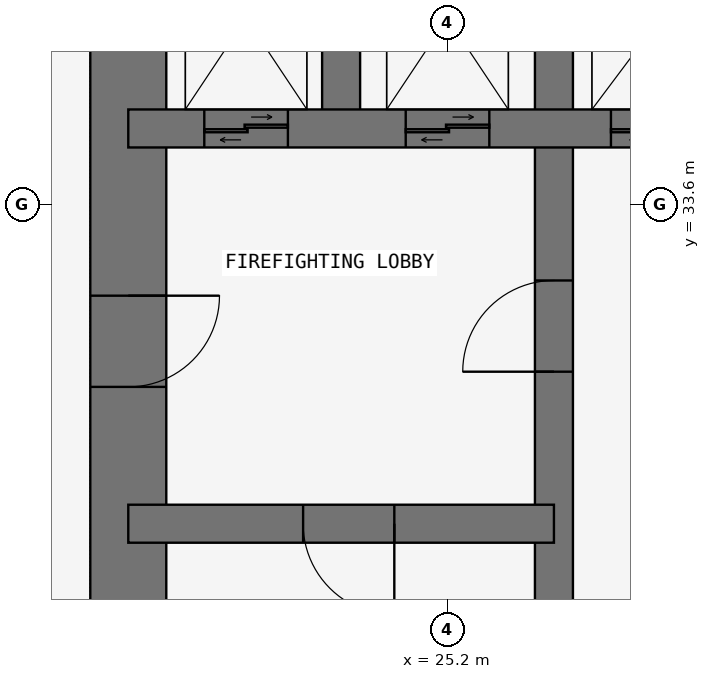
"""IFC4 building model, lengths in metres.
Left out: names, types, materials, properties, quantities, classifications, styles, units other than length and angle.
Written with IfcOpenShell. Run it as: python <this file> out.ifc"""

import sys

from ifc_helpers import new_model, si_unit, direction, frame, frame_2d, origin, place, context, subcontext, project, spatial, rectangle, extrude, element, fill, save


model = new_model("IFC4")
c1 = context("Model", 3, precision=1e-05, world=origin(), true_north=direction((0.0, 1.0)))
c2 = subcontext(c1, "Body", "Model", "MODEL_VIEW")
j1 = project(units=[si_unit("LENGTHUNIT", "METRE"), si_unit("PLANEANGLEUNIT", "RADIAN")], contexts=[c1])
p1 = place(None, origin())
s1 = spatial("IfcSite", under=j1, at=p1, CompositionType="ELEMENT")
p2 = place(p1, origin())
s2 = spatial("IfcBuilding", under=s1, at=p2, CompositionType="ELEMENT")
p3 = place(p2, frame((0.0, 0.0, 19.5)))
s3 = spatial("IfcBuildingStorey", under=s2, at=p3, CompositionType="ELEMENT", Elevation=19.5)
p4 = place(p3, frame((21.0, 37.8, 0.0), z_axis=(0.0, 0.0, 1.0), x_axis=(0.0, -1.0, 0.0)))
e1 = element("IfcWall", 1, at=p4, inside=s3, PredefinedType="SHEAR", context=c2, shape_type="SweptSolid", body=[
    extrude(rectangle(XDim=17.3, YDim=1.0, at=frame_2d((8.65, 0.0))), origin(), (0.0, 0.0, 1.0), 4.5),
])
p5 = place(p4, frame((5.4, 0.0, 0.0)))
e2 = element("IfcOpeningElement", 2, at=p5, cuts=e1, PredefinedType="OPENING", context=c2, shape_type="SweptSolid", body=[
    extrude(rectangle(XDim=1.2, YDim=2.1, at=frame_2d((0.6, 1.05))), frame((0.0, 0.51, 0.0), z_axis=(0.0, -1.0, 0.0), x_axis=(1.0, 0.0, 0.0)), (0.0, 0.0, 1.0), 1.02),
])
p6 = place(p3, frame((26.6, 21.0, 0.0), z_axis=(0.0, 0.0, 1.0), x_axis=(0.0, 1.0, 0.0)))
e3 = element("IfcWall", 3, at=p6, inside=s3, PredefinedType="SHEAR", context=c2, shape_type="SweptSolid", body=[
    extrude(rectangle(XDim=16.8, YDim=0.5, at=frame_2d((8.4, 0.0))), origin(), (0.0, 0.0, 1.0), 4.5),
])
p7 = place(p6, frame((10.4, 0.0, 0.0)))
e4 = element("IfcOpeningElement", 4, at=p7, cuts=e3, PredefinedType="OPENING", context=c2, shape_type="SweptSolid", body=[
    extrude(rectangle(XDim=1.2, YDim=2.1, at=frame_2d((0.6, 1.05))), frame((0.0, 0.26, 0.0), z_axis=(0.0, -1.0, 0.0), x_axis=(1.0, 0.0, 0.0)), (0.0, 0.0, 1.0), 0.52),
])
p8 = place(p3, frame((21.0, 29.4, 0.0), z_axis=(0.0, 0.0, 1.0), x_axis=(1.0, 0.0, 0.0)))
e5 = element("IfcWall", 5, at=p8, inside=s3, PredefinedType="SHEAR", context=c2, shape_type="SweptSolid", body=[
    extrude(rectangle(XDim=5.6, YDim=0.5, at=frame_2d((2.8, 0.0))), origin(), (0.0, 0.0, 1.0), 4.5),
])
p9 = place(p8, frame((2.3, 0.0, 0.0)))
e6 = element("IfcOpeningElement", 6, at=p9, cuts=e5, PredefinedType="OPENING", context=c2, shape_type="SweptSolid", body=[
    extrude(rectangle(XDim=1.2, YDim=2.1, at=frame_2d((0.6, 1.05))), frame((0.0, 0.26, 0.0), z_axis=(0.0, -1.0, 0.0), x_axis=(1.0, 0.0, 0.0)), (0.0, 0.0, 1.0), 0.52),
])
p10 = place(p3, frame((21.0, 34.6, 0.0), z_axis=(0.0, 0.0, 1.0), x_axis=(1.0, 0.0, 0.0)))
e7 = element("IfcWall", 7, at=p10, inside=s3, PredefinedType="SHEAR", context=c2, shape_type="SweptSolid", body=[
    extrude(rectangle(XDim=11.2, YDim=0.5, at=frame_2d((5.6, 0.0))), origin(), (0.0, 0.0, 1.0), 4.5),
])
p11 = place(p10, frame((9.35, 0.0, 0.0)))
e8 = element("IfcOpeningElement", 8, at=p11, cuts=e7, PredefinedType="OPENING", context=c2, shape_type="SweptSolid", body=[
    extrude(rectangle(XDim=0.9, YDim=2.1, at=frame_2d((0.45, 1.05))), frame((0.0, 0.26, 0.0), z_axis=(0.0, -1.0, 0.0), x_axis=(1.0, 0.0, 0.0)), (0.0, 0.0, 1.0), 0.52),
])
p12 = place(p10, frame((1.0, 0.0, 0.0)))
e9 = element("IfcOpeningElement", 9, at=p12, cuts=e7, PredefinedType="OPENING", context=c2, shape_type="SweptSolid", body=[
    extrude(rectangle(XDim=1.1, YDim=2.1, at=frame_2d((0.55, 1.05))), frame((0.0, 0.26, 0.0), z_axis=(0.0, -1.0, 0.0), x_axis=(1.0, 0.0, 0.0)), (0.0, 0.0, 1.0), 0.52),
])
p13 = place(p10, frame((3.65, 0.0, 0.0)))
e10 = element("IfcOpeningElement", 10, at=p13, cuts=e7, PredefinedType="OPENING", context=c2, shape_type="SweptSolid", body=[
    extrude(rectangle(XDim=1.1, YDim=2.1, at=frame_2d((0.55, 1.05))), frame((0.0, 0.26, 0.0), z_axis=(0.0, -1.0, 0.0), x_axis=(1.0, 0.0, 0.0)), (0.0, 0.0, 1.0), 0.52),
])
p14 = place(p10, frame((6.35, 0.0, 0.0)))
e11 = element("IfcOpeningElement", 11, at=p14, cuts=e7, PredefinedType="OPENING", context=c2, shape_type="SweptSolid", body=[
    extrude(rectangle(XDim=1.3, YDim=2.1, at=frame_2d((0.65, 1.05))), frame((0.0, 0.26, 0.0), z_axis=(0.0, -1.0, 0.0), x_axis=(1.0, 0.0, 0.0)), (0.0, 0.0, 1.0), 0.52),
])
p15 = place(p3, frame((23.8, 34.6, 0.0), z_axis=(0.0, 0.0, 1.0), x_axis=(0.0, 1.0, 0.0)))
e12 = element("IfcWall", 12, at=p15, inside=s3, PredefinedType="SHEAR", context=c2, shape_type="SweptSolid", body=[
    extrude(rectangle(XDim=3.2, YDim=0.5, at=frame_2d((1.6, 0.0))), origin(), (0.0, 0.0, 1.0), 4.5),
])
p16 = place(p5, origin())
e13 = element("IfcDoor", 13, at=p16, inside=s3, OperationType="SINGLE_SWING_LEFT", PredefinedType="DOOR", context=c2, shape_type="SweptSolid", body=[
    extrude(rectangle(XDim=1.2, YDim=2.1, at=frame_2d((0.6, 1.05))), frame((0.0, 0.025, 0.0), z_axis=(0.0, -1.0, 0.0), x_axis=(1.0, 0.0, 0.0)), (0.0, 0.0, 1.0), 0.05),
])
fill(e2, e13)
p17 = place(p9, frame((1.2, 0.0, 0.0), z_axis=(0.0, 0.0, 1.0), x_axis=(-1.0, 0.0, 0.0)))
e14 = element("IfcDoor", 14, at=p17, inside=s3, OperationType="SINGLE_SWING_LEFT", PredefinedType="DOOR", context=c2, shape_type="SweptSolid", body=[
    extrude(rectangle(XDim=1.2, YDim=2.1, at=frame_2d((0.6, 1.05))), frame((0.0, 0.025, 0.0), z_axis=(0.0, -1.0, 0.0), x_axis=(1.0, 0.0, 0.0)), (0.0, 0.0, 1.0), 0.05),
])
fill(e6, e14)
p18 = place(p7, origin())
e15 = element("IfcDoor", 15, at=p18, inside=s3, OperationType="SINGLE_SWING_LEFT", PredefinedType="DOOR", context=c2, shape_type="SweptSolid", body=[
    extrude(rectangle(XDim=1.2, YDim=2.1, at=frame_2d((0.6, 1.05))), frame((0.0, 0.025, 0.0), z_axis=(0.0, -1.0, 0.0), x_axis=(1.0, 0.0, 0.0)), (0.0, 0.0, 1.0), 0.05),
])
fill(e4, e15)
p19 = place(p12, origin())
e16 = element("IfcDoor", 16, at=p19, inside=s3, OperationType="DOUBLE_DOOR_SLIDING", PredefinedType="DOOR", context=c2, shape_type="SweptSolid", body=[
    extrude(rectangle(XDim=1.1, YDim=2.1, at=frame_2d((0.55, 1.05))), frame((0.0, 0.025, 0.0), z_axis=(0.0, -1.0, 0.0), x_axis=(1.0, 0.0, 0.0)), (0.0, 0.0, 1.0), 0.05),
])
fill(e9, e16)
p20 = place(p13, origin())
e17 = element("IfcDoor", 17, at=p20, inside=s3, OperationType="DOUBLE_DOOR_SLIDING", PredefinedType="DOOR", context=c2, shape_type="SweptSolid", body=[
    extrude(rectangle(XDim=1.1, YDim=2.1, at=frame_2d((0.55, 1.05))), frame((0.0, 0.025, 0.0), z_axis=(0.0, -1.0, 0.0), x_axis=(1.0, 0.0, 0.0)), (0.0, 0.0, 1.0), 0.05),
])
fill(e10, e17)
p21 = place(p14, origin())
e18 = element("IfcDoor", 18, at=p21, inside=s3, OperationType="DOUBLE_DOOR_SLIDING", PredefinedType="DOOR", context=c2, shape_type="SweptSolid", body=[
    extrude(rectangle(XDim=1.3, YDim=2.1, at=frame_2d((0.65, 1.05))), frame((0.0, 0.025, 0.0), z_axis=(0.0, -1.0, 0.0), x_axis=(1.0, 0.0, 0.0)), (0.0, 0.0, 1.0), 0.05),
])
fill(e11, e18)
save(model, sys.argv[1])
